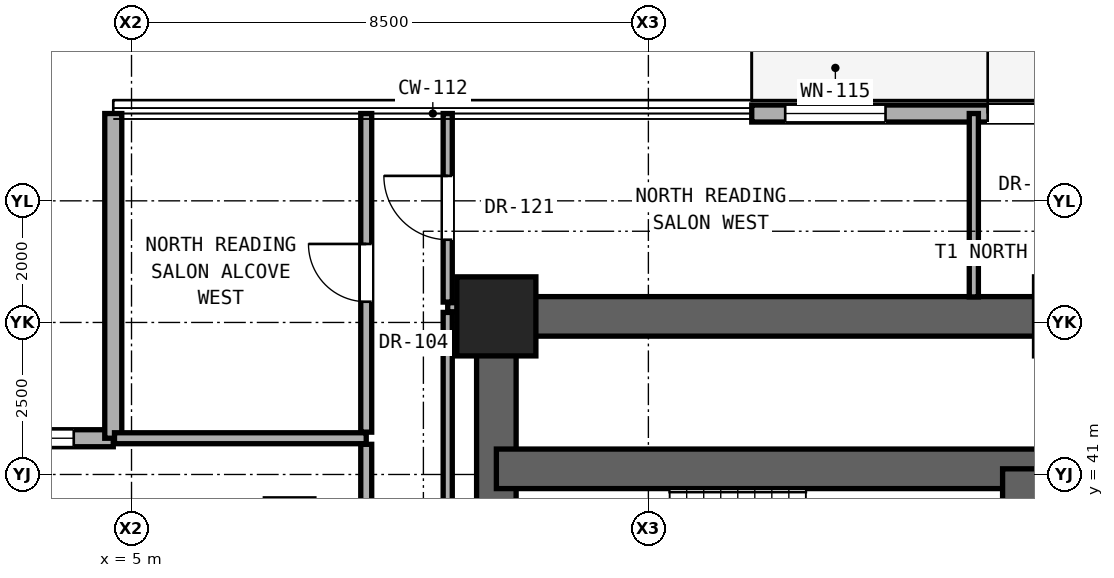
"""IFC4 building model, lengths in metres.
Left out: names, types, materials, properties, quantities, classifications, styles, units other than length and angle.
Written with IfcOpenShell. Run it as: python <this file> out.ifc"""

import sys

from ifc_helpers import new_model, si_unit, direction, frame, frame_2d, origin, origin_2d, place, context, subcontext, project, spatial, rectangle, extrude, element, fill, save


model = new_model("IFC4")
c1 = context("Model", 3, precision=1e-05, world=origin(), true_north=direction((0.0, 1.0)))
c2 = subcontext(c1, "Body", "Model", "MODEL_VIEW")
j1 = project(units=[si_unit("LENGTHUNIT", "METRE"), si_unit("PLANEANGLEUNIT", "RADIAN")], contexts=[c1])
p1 = place(None, origin())
s1 = spatial("IfcSite", under=j1, at=p1, CompositionType="ELEMENT")
p2 = place(p1, origin())
s2 = spatial("IfcBuilding", under=s1, at=p2, CompositionType="ELEMENT")
p3 = place(p2, frame((0.0, 0.0, 58.7)))
s3 = spatial("IfcBuildingStorey", under=s2, at=p3, CompositionType="ELEMENT", Elevation=58.7)
for number, where, z_axis, x_axis in (
    (1, (11.0, 43.6, 0.0), (0.0, 0.0, 1.0), (1.0, 0.0, 0.0)),
    (2, (20.5, 43.6, 0.0), (0.0, 0.0, 1.0), (1.0, 0.0, 0.0)),
):
    element("IfcColumn", number, at=place(p3, frame(where, z_axis=z_axis, x_axis=x_axis)), inside=s3, PredefinedType="COLUMN", context=c2, shape_type="SweptSolid", body=[
        extrude(rectangle(XDim=1.3, YDim=1.3, at=origin_2d()), origin(), (0.0, 0.0, 1.0), 3.3),
    ])
p4 = place(p3, frame((7.6, 40.0, 0.0), z_axis=(0.0, 0.0, 1.0), x_axis=(1.0, 0.0, 0.0)))
e3 = element("IfcColumn", 3, at=p4, inside=s3, PredefinedType="PILASTER", context=c2, shape_type="SweptSolid", body=[
    extrude(rectangle(XDim=0.8, YDim=1.2, at=origin_2d()), origin(), (0.0, 0.0, 1.0), 3.3),
])
p5 = place(p3, frame((11.0, 43.6, 0.0), z_axis=(0.0, 0.0, 1.0), x_axis=(1.0, 0.0, 0.0)))
e4 = element("IfcWall", 4, at=p5, inside=s3, PredefinedType="SHEAR", context=c2, shape_type="SweptSolid", body=[
    extrude(rectangle(XDim=19.0, YDim=0.65, at=frame_2d((9.5, 0.0))), origin(), (0.0, 0.0, 1.0), 3.06),
])
p6 = place(p3, frame((11.0, 37.6, 0.0), z_axis=(0.0, 0.0, 1.0), x_axis=(0.0, 1.0, 0.0)))
e5 = element("IfcWall", 5, at=p6, inside=s3, PredefinedType="SHEAR", context=c2, shape_type="SweptSolid", body=[
    extrude(rectangle(XDim=6.0, YDim=0.65, at=frame_2d((3.0, 0.0))), origin(), (0.0, 0.0, 1.0), 3.06),
])
p7 = place(p3, frame((11.0, 41.093, 0.0), z_axis=(0.0, 0.0, 1.0), x_axis=(1.0, 0.0, 0.0)))
e6 = element("IfcWall", 6, at=p7, inside=s3, PredefinedType="SHEAR", context=c2, shape_type="SweptSolid", body=[
    extrude(rectangle(XDim=9.0, YDim=0.65, at=frame_2d((4.5, 0.0))), origin(), (0.0, 0.0, 1.0), 3.06),
])
p8 = place(p3, frame((19.65, 37.6, 0.0), z_axis=(0.0, 0.0, 1.0), x_axis=(0.0, 1.0, 0.0)))
e7 = element("IfcWall", 7, at=p8, inside=s3, PredefinedType="SHEAR", context=c2, shape_type="SweptSolid", body=[
    extrude(rectangle(XDim=3.493, YDim=0.65, at=frame_2d((1.747, 0.0))), origin(), (0.0, 0.0, 1.0), 3.06),
])
p9 = place(p3, frame((15.2, 46.936, 0.0), z_axis=(0.0, 0.0, 1.0), x_axis=(1.0, 0.0, 0.0)))
e8 = element("IfcWall", 8, at=p9, inside=s3, PredefinedType="SOLIDWALL", context=c2, shape_type="SweptSolid", body=[
    extrude(rectangle(XDim=10.6, YDim=0.28, at=frame_2d((5.3, 0.0))), origin(), (0.0, 0.0, 1.0), 3.02),
])
p10 = place(p9, frame((0.55, 0.0, 0.67)))
e9 = element("IfcOpeningElement", 9, at=p10, cuts=e8, PredefinedType="OPENING", context=c2, shape_type="SweptSolid", body=[
    extrude(rectangle(XDim=1.65, YDim=2.2, at=frame_2d((0.825, 1.1))), frame((0.0, 0.15, 0.0), z_axis=(0.0, -1.0, 0.0), x_axis=(1.0, 0.0, 0.0)), (0.0, 0.0, 1.0), 0.3),
])
p11 = place(p9, frame((3.88, 0.0, 0.0)))
e10 = element("IfcOpeningElement", 10, at=p11, cuts=e8, PredefinedType="OPENING", context=c2, shape_type="SweptSolid", body=[
    extrude(rectangle(XDim=1.5, YDim=2.3, at=frame_2d((0.75, 1.15))), frame((0.0, 0.15, 0.0), z_axis=(0.0, -1.0, 0.0), x_axis=(1.0, 0.0, 0.0)), (0.0, 0.0, 1.0), 0.3),
])
p12 = place(p3, frame((4.7, 41.596, 0.0), z_axis=(0.0, 0.0, 1.0), x_axis=(-1.0, 0.0, 0.0)))
e11 = element("IfcWall", 11, at=p12, inside=s3, PredefinedType="SOLIDWALL", context=c2, shape_type="SweptSolid", body=[
    extrude(rectangle(XDim=5.34, YDim=0.28, at=frame_2d((2.67, 0.0))), origin(), (0.0, 0.0, 1.0), 3.04),
])
p13 = place(p12, frame((0.65, 0.0, 0.85)))
e12 = element("IfcOpeningElement", 12, at=p13, cuts=e11, PredefinedType="OPENING", context=c2, shape_type="SweptSolid", body=[
    extrude(rectangle(XDim=1.1, YDim=2.0, at=frame_2d((0.55, 1.0))), frame((0.0, 0.15, 0.0), z_axis=(0.0, -1.0, 0.0), x_axis=(1.0, 0.0, 0.0)), (0.0, 0.0, 1.0), 0.3),
])
p14 = place(p3, frame((4.7, 46.936, 0.0), z_axis=(0.0, 0.0, 1.0), x_axis=(0.0, -1.0, 0.0)))
e13 = element("IfcWall", 13, at=p14, inside=s3, PredefinedType="SOLIDWALL", context=c2, shape_type="SweptSolid", body=[
    extrude(rectangle(XDim=5.34, YDim=0.28, at=frame_2d((2.67, 0.0))), origin(), (0.0, 0.0, 1.0), 3.04),
])
p15 = place(p3, frame((4.72, 41.596, 0.0), z_axis=(0.0, 0.0, 1.0), x_axis=(1.0, 0.0, 0.0)))
e14 = element("IfcWall", 14, at=p15, inside=s3, PredefinedType="PARTITIONING", context=c2, shape_type="SweptSolid", body=[
    extrude(rectangle(XDim=4.14, YDim=0.18, at=frame_2d((2.07, 0.0))), origin(), (0.0, 0.0, 1.0), 3.06),
])
p16 = place(p3, frame((10.2, 43.75, 0.0), z_axis=(0.0, 0.0, 1.0), x_axis=(1.0, 0.0, 0.0)))
e15 = element("IfcWall", 15, at=p16, inside=s3, PredefinedType="PARTITIONING", context=c2, shape_type="SweptSolid", body=[
    extrude(rectangle(XDim=0.48, YDim=0.15, at=frame_2d((0.24, 0.0))), origin(), (0.0, 0.0, 1.0), 3.06),
])
p17 = place(p3, frame((8.86, 29.686, 0.0), z_axis=(0.0, 0.0, 1.0), x_axis=(0.0, 1.0, 0.0)))
e16 = element("IfcWall", 16, at=p17, inside=s3, PredefinedType="PARTITIONING", context=c2, shape_type="SweptSolid", body=[
    extrude(rectangle(XDim=11.81, YDim=0.18, at=frame_2d((5.905, 0.0))), origin(), (0.0, 0.0, 1.0), 2.279),
])
p18 = place(p17, frame((5.38, 0.0, 0.0)))
e17 = element("IfcOpeningElement", 17, at=p18, cuts=e16, PredefinedType="OPENING", context=c2, shape_type="SweptSolid", body=[
    extrude(rectangle(XDim=1.05, YDim=2.2, at=frame_2d((0.525, 1.1))), frame((0.0, 0.1, 0.0), z_axis=(0.0, -1.0, 0.0), x_axis=(1.0, 0.0, 0.0)), (0.0, 0.0, 1.0), 0.2),
])
p19 = place(p3, frame((8.86, 41.696, 0.0), z_axis=(0.0, 0.0, 1.0), x_axis=(0.0, 1.0, 0.0)))
e18 = element("IfcWall", 18, at=p19, inside=s3, PredefinedType="PARTITIONING", context=c2, shape_type="SweptSolid", body=[
    extrude(rectangle(XDim=5.24, YDim=0.18, at=frame_2d((2.62, 0.0))), origin(), (0.0, 0.0, 1.0), 3.06),
])
p20 = place(p19, frame((2.145, 0.0, 0.0)))
e19 = element("IfcOpeningElement", 19, at=p20, cuts=e18, PredefinedType="OPENING", context=c2, shape_type="SweptSolid", body=[
    extrude(rectangle(XDim=0.95, YDim=2.15, at=frame_2d((0.475, 1.075))), frame((0.0, 0.1, 0.0), z_axis=(0.0, -1.0, 0.0), x_axis=(1.0, 0.0, 0.0)), (0.0, 0.0, 1.0), 0.2),
])
p21 = place(p3, frame((10.2, 34.535, 0.0), z_axis=(0.0, 0.0, 1.0), x_axis=(0.0, 1.0, 0.0)))
e20 = element("IfcWall", 20, at=p21, inside=s3, PredefinedType="PARTITIONING", context=c2, shape_type="SweptSolid", body=[
    extrude(rectangle(XDim=9.13, YDim=0.15, at=frame_2d((4.565, 0.0))), origin(), (0.0, 0.0, 1.0), 2.436),
])
p22 = place(p3, frame((10.2, 43.835, 0.0), z_axis=(0.0, 0.0, 1.0), x_axis=(0.0, 1.0, 0.0)))
e21 = element("IfcWall", 21, at=p22, inside=s3, PredefinedType="PARTITIONING", context=c2, shape_type="SweptSolid", body=[
    extrude(rectangle(XDim=3.101, YDim=0.15, at=frame_2d((1.551, 0.0))), origin(), (0.0, 0.0, 1.0), 3.06),
])
p23 = place(p22, frame((1.025, 0.0, 0.0)))
e22 = element("IfcOpeningElement", 22, at=p23, cuts=e21, PredefinedType="OPENING", context=c2, shape_type="SweptSolid", body=[
    extrude(rectangle(XDim=1.05, YDim=2.2, at=frame_2d((0.525, 1.1))), frame((0.0, 0.085, 0.0), z_axis=(0.0, -1.0, 0.0), x_axis=(1.0, 0.0, 0.0)), (0.0, 0.0, 1.0), 0.17),
])
p24 = place(p3, frame((18.852, 43.92, 0.0), z_axis=(0.0, 0.0, 1.0), x_axis=(0.0, 1.0, 0.0)))
e23 = element("IfcWall", 23, at=p24, inside=s3, PredefinedType="PARTITIONING", context=c2, shape_type="SweptSolid", body=[
    extrude(rectangle(XDim=3.016, YDim=0.15, at=frame_2d((1.508, 0.0))), origin(), (0.0, 0.0, 1.0), 3.06),
])
p25 = place(p10, origin())
e24 = element("IfcWindow", 24, at=p25, inside=s3, PartitioningType="SINGLE_PANEL", PredefinedType="WINDOW", context=c2, shape_type="SweptSolid", body=[
    extrude(rectangle(XDim=1.65, YDim=2.2, at=frame_2d((0.825, 1.1))), frame((0.0, 0.03, 0.0), z_axis=(0.0, -1.0, 0.0), x_axis=(1.0, 0.0, 0.0)), (0.0, 0.0, 1.0), 0.06),
])
fill(e9, e24)
p26 = place(p11, origin())
e25 = element("IfcDoor", 25, at=p26, inside=s3, OperationType="SINGLE_SWING_LEFT", PredefinedType="DOOR", context=c2, shape_type="SweptSolid", body=[
    extrude(rectangle(XDim=1.5, YDim=2.3, at=frame_2d((0.75, 1.15))), frame((0.0, 0.025, 0.0), z_axis=(0.0, -1.0, 0.0), x_axis=(1.0, 0.0, 0.0)), (0.0, 0.0, 1.0), 0.05),
])
fill(e10, e25)
p27 = place(p13, origin())
e26 = element("IfcWindow", 26, at=p27, inside=s3, PartitioningType="SINGLE_PANEL", PredefinedType="WINDOW", context=c2, shape_type="SweptSolid", body=[
    extrude(rectangle(XDim=1.1, YDim=2.0, at=frame_2d((0.55, 1.0))), frame((0.0, 0.03, 0.0), z_axis=(0.0, -1.0, 0.0), x_axis=(1.0, 0.0, 0.0)), (0.0, 0.0, 1.0), 0.06),
])
fill(e12, e26)
p28 = place(p23, origin())
e27 = element("IfcDoor", 27, at=p28, inside=s3, OperationType="SINGLE_SWING_RIGHT", PredefinedType="DOOR", context=c2, shape_type="SweptSolid", body=[
    extrude(rectangle(XDim=1.05, YDim=2.2, at=frame_2d((0.525, 1.1))), frame((0.0, 0.025, 0.0), z_axis=(0.0, -1.0, 0.0), x_axis=(1.0, 0.0, 0.0)), (0.0, 0.0, 1.0), 0.05),
])
fill(e22, e27)
p29 = place(p20, origin())
e28 = element("IfcDoor", 28, at=p29, inside=s3, OperationType="SINGLE_SWING_RIGHT", PredefinedType="DOOR", context=c2, shape_type="SweptSolid", body=[
    extrude(rectangle(XDim=0.95, YDim=2.15, at=frame_2d((0.475, 1.075))), frame((0.0, 0.025, 0.0), z_axis=(0.0, -1.0, 0.0), x_axis=(1.0, 0.0, 0.0)), (0.0, 0.0, 1.0), 0.05),
])
fill(e19, e28)
save(model, sys.argv[1])
